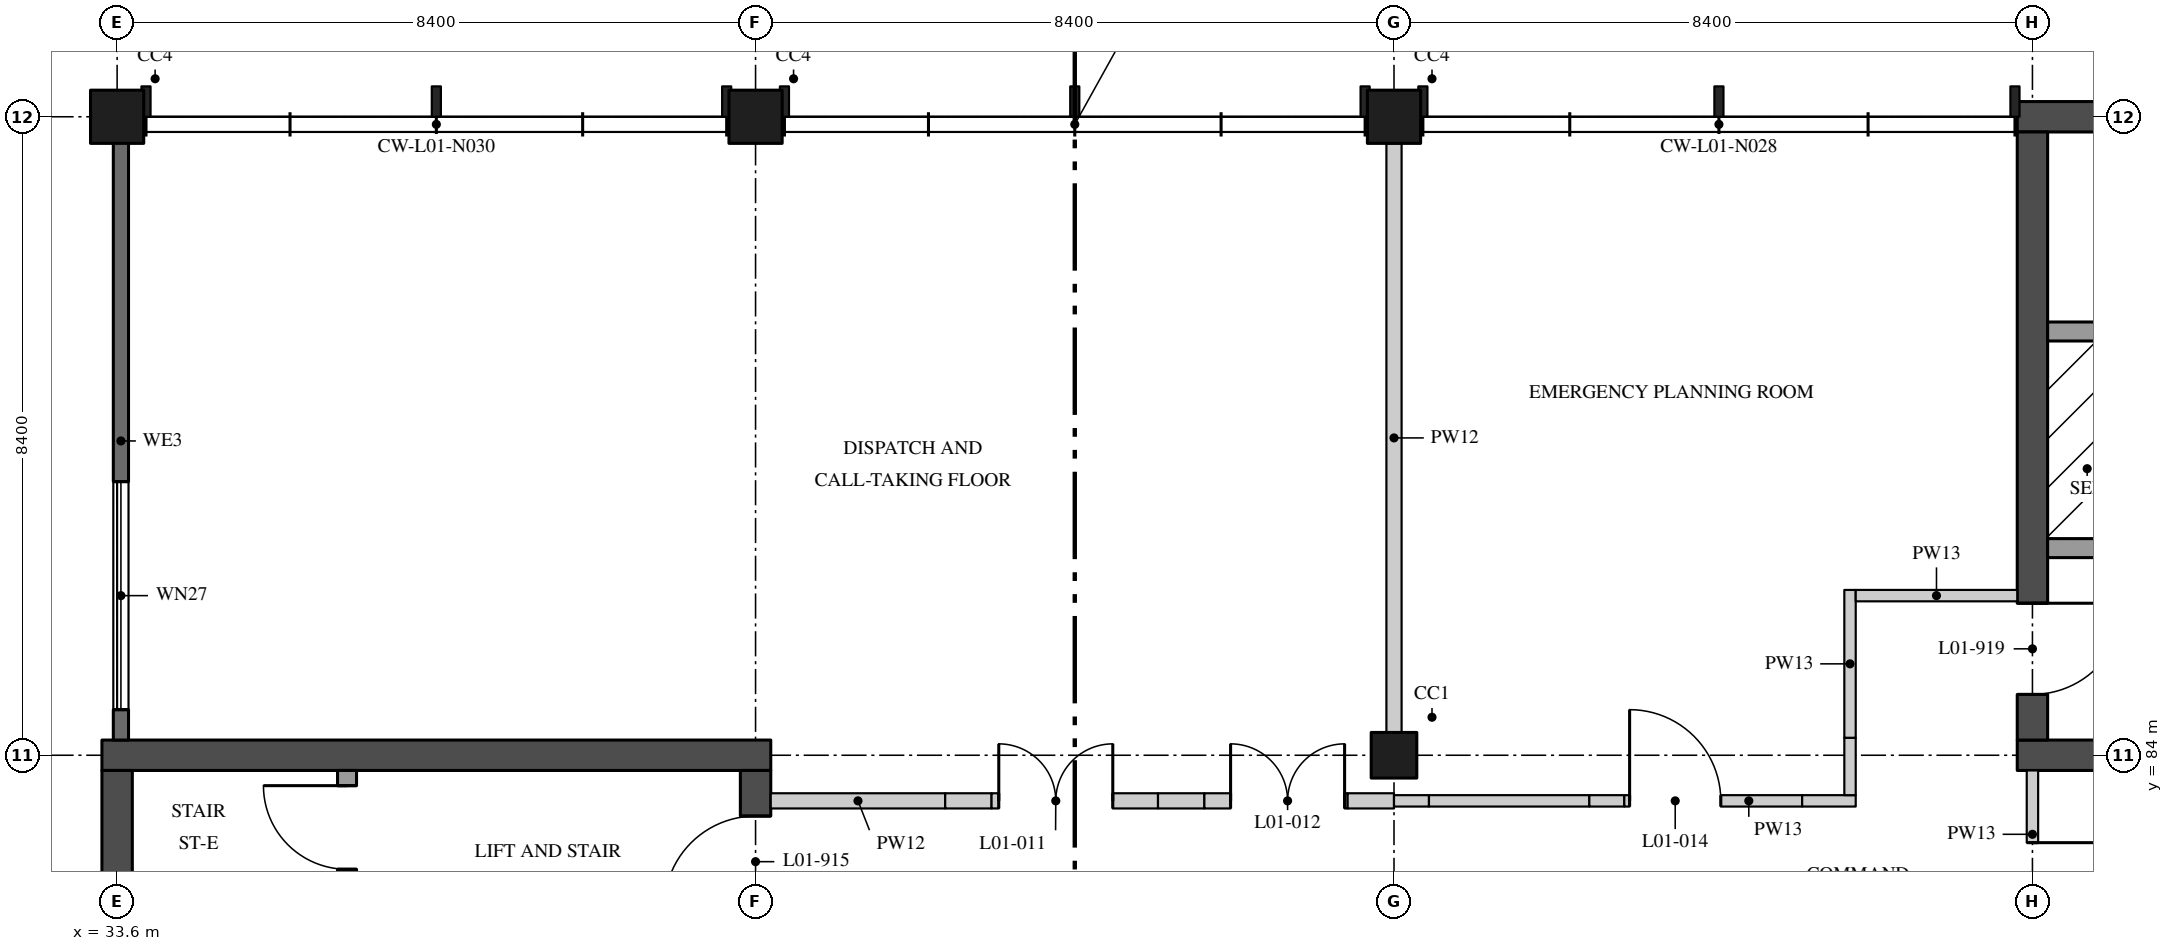
"""IFC4 building model, lengths in metres.
Left out: names, types, materials, properties, quantities, classifications, styles, units other than length and angle.
Written with IfcOpenShell. Run it as: python <this file> out.ifc"""

import sys

from ifc_helpers import new_model, si_unit, direction, frame, frame_2d, origin, origin_2d, place, context, subcontext, project, spatial, rectangle, extrude, element, fill, save


model = new_model("IFC4")
c1 = context("Model", 3, precision=1e-05, world=origin(), true_north=direction((0.0, 1.0)))
c2 = subcontext(c1, "Body", "Model", "MODEL_VIEW")
j1 = project(units=[si_unit("LENGTHUNIT", "METRE"), si_unit("PLANEANGLEUNIT", "RADIAN")], contexts=[c1])
p1 = place(None, origin())
s1 = spatial("IfcSite", under=j1, at=p1, CompositionType="ELEMENT")
p2 = place(p1, origin())
s2 = spatial("IfcBuilding", under=s1, at=p2, CompositionType="ELEMENT")
p3 = place(p2, frame((0.0, 0.0, 5.4)))
s3 = spatial("IfcBuildingStorey", under=s2, at=p3, CompositionType="ELEMENT", Elevation=5.4)
for number, where, z_axis, x_axis in (
    (1, (33.6, 92.4, 0.0), (0.0, 0.0, 1.0), (1.0, 0.0, 0.0)),
    (2, (42.0, 92.4, 0.0), (0.0, 0.0, 1.0), (1.0, 0.0, 0.0)),
):
    element("IfcColumn", number, at=place(p3, frame(where, z_axis=z_axis, x_axis=x_axis)), inside=s3, PredefinedType="COLUMN", context=c2, shape_type="SweptSolid", body=[
        extrude(rectangle(XDim=0.7, YDim=0.7, at=origin_2d()), origin(), (0.0, 0.0, 1.0), 4.37),
    ])
p4 = place(p3, frame((50.4, 84.0, 0.0), z_axis=(0.0, 0.0, 1.0), x_axis=(1.0, 0.0, 0.0)))
e3 = element("IfcColumn", 3, at=p4, inside=s3, PredefinedType="COLUMN", context=c2, shape_type="SweptSolid", body=[
    extrude(rectangle(XDim=0.6, YDim=0.6, at=origin_2d()), origin(), (0.0, 0.0, 1.0), 4.37),
])
p5 = place(p3, frame((50.4, 92.4, 0.0), z_axis=(0.0, 0.0, 1.0), x_axis=(1.0, 0.0, 0.0)))
e4 = element("IfcColumn", 4, at=p5, inside=s3, PredefinedType="COLUMN", context=c2, shape_type="SweptSolid", body=[
    extrude(rectangle(XDim=0.7, YDim=0.7, at=origin_2d()), origin(), (0.0, 0.0, 1.0), 4.37),
])
p6 = place(p3, frame((33.4, 84.0, 0.0), z_axis=(0.0, 0.0, 1.0), x_axis=(1.0, 0.0, 0.0)))
e5 = element("IfcWall", 5, at=p6, inside=s3, PredefinedType="SHEAR", context=c2, shape_type="SweptSolid", body=[
    extrude(rectangle(XDim=8.8, YDim=0.4, at=frame_2d((4.4, 0.0))), origin(), (0.0, 0.0, 1.0), 4.37),
])
p7 = place(p3, frame((33.6, 75.8, 0.0), z_axis=(0.0, 0.0, 1.0), x_axis=(0.0, 1.0, 0.0)))
e6 = element("IfcWall", 6, at=p7, inside=s3, PredefinedType="SHEAR", context=c2, shape_type="SweptSolid", body=[
    extrude(rectangle(XDim=8.0, YDim=0.4, at=frame_2d((4.0, 0.0))), origin(), (0.0, 0.0, 1.0), 4.37),
])
p8 = place(p3, frame((42.0, 75.8, 0.0), z_axis=(0.0, 0.0, 1.0), x_axis=(0.0, 1.0, 0.0)))
e7 = element("IfcWall", 7, at=p8, inside=s3, PredefinedType="SHEAR", context=c2, shape_type="SweptSolid", body=[
    extrude(rectangle(XDim=8.0, YDim=0.4, at=frame_2d((4.0, 0.0))), origin(), (0.0, 0.0, 1.0), 4.37),
])
p9 = place(p8, frame((6.2, 0.0, 0.0)))
e8 = element("IfcOpeningElement", 8, at=p9, cuts=e7, PredefinedType="OPENING", context=c2, shape_type="SweptSolid", body=[
    extrude(rectangle(XDim=1.2, YDim=2.1, at=frame_2d((0.6, 1.05))), frame((0.0, 0.21, 0.0), z_axis=(0.0, -1.0, 0.0), x_axis=(1.0, 0.0, 0.0)), (0.0, 0.0, 1.0), 0.42),
])
p10 = place(p3, frame((36.625, 83.8, 0.0), z_axis=(0.0, 0.0, 1.0), x_axis=(0.0, -1.0, 0.0)))
e9 = element("IfcWall", 9, at=p10, inside=s3, PredefinedType="SOLIDWALL", context=c2, shape_type="SweptSolid", body=[
    extrude(rectangle(XDim=8.0, YDim=0.25, at=frame_2d((4.0, 0.0))), origin(), (0.0, 0.0, 1.0), 4.37),
])
p11 = place(p10, frame((0.2, 0.0, 0.0)))
e10 = element("IfcOpeningElement", 10, at=p11, cuts=e9, PredefinedType="OPENING", context=c2, shape_type="SweptSolid", body=[
    extrude(rectangle(XDim=1.1, YDim=2.1, at=frame_2d((0.55, 1.05))), frame((0.0, 0.135, 0.0), z_axis=(0.0, -1.0, 0.0), x_axis=(1.0, 0.0, 0.0)), (0.0, 0.0, 1.0), 0.27),
])
for number, where, z_axis, x_axis in (
    (11, (58.6, 84.0, 0.0), (0.0, 0.0, 1.0), (1.0, 0.0, 0.0)),
    (12, (58.6, 92.4, 0.0), (0.0, 0.0, 1.0), (1.0, 0.0, 0.0)),
):
    element("IfcWall", number, at=place(p3, frame(where, z_axis=z_axis, x_axis=x_axis)), inside=s3, PredefinedType="SHEAR", context=c2, shape_type="SweptSolid", body=[
        extrude(rectangle(XDim=8.8, YDim=0.4, at=frame_2d((4.4, 0.0))), origin(), (0.0, 0.0, 1.0), 4.37),
    ])
p12 = place(p3, frame((58.8, 84.2, 0.0), z_axis=(0.0, 0.0, 1.0), x_axis=(0.0, 1.0, 0.0)))
e13 = element("IfcWall", 13, at=p12, inside=s3, PredefinedType="SHEAR", context=c2, shape_type="SweptSolid", body=[
    extrude(rectangle(XDim=8.0, YDim=0.4, at=frame_2d((4.0, 0.0))), origin(), (0.0, 0.0, 1.0), 4.37),
])
p13 = place(p12, frame((0.6, 0.0, 0.0)))
e14 = element("IfcOpeningElement", 14, at=p13, cuts=e13, PredefinedType="OPENING", context=c2, shape_type="SweptSolid", body=[
    extrude(rectangle(XDim=1.2, YDim=2.1, at=frame_2d((0.6, 1.05))), frame((0.0, 0.21, 0.0), z_axis=(0.0, -1.0, 0.0), x_axis=(1.0, 0.0, 0.0)), (0.0, 0.0, 1.0), 0.42),
])
p14 = place(p3, frame((61.8, 86.725, 0.0), z_axis=(0.0, 0.0, 1.0), x_axis=(-1.0, 0.0, 0.0)))
e15 = element("IfcWall", 15, at=p14, inside=s3, PredefinedType="SOLIDWALL", context=c2, shape_type="SweptSolid", body=[
    extrude(rectangle(XDim=2.8, YDim=0.25, at=frame_2d((1.4, 0.0))), origin(), (0.0, 0.0, 1.0), 4.37),
])
p15 = place(p3, frame((61.55, 89.575, 0.0), z_axis=(0.0, 0.0, 1.0), x_axis=(-1.0, 0.0, 0.0)))
e16 = element("IfcWall", 16, at=p15, inside=s3, PredefinedType="SOLIDWALL", context=c2, shape_type="SweptSolid", body=[
    extrude(rectangle(XDim=2.55, YDim=0.25, at=frame_2d((1.275, 0.0))), origin(), (0.0, 0.0, 1.0), 4.37),
])
p16 = place(p3, frame((58.8, 81.0, 0.0), z_axis=(0.0, 0.0, 1.0), x_axis=(0.0, 1.0, 0.0)))
e17 = element("IfcWall", 17, at=p16, inside=s3, PredefinedType="PARTITIONING", context=c2, shape_type="SweptSolid", body=[
    extrude(rectangle(XDim=2.8, YDim=0.15, at=frame_2d((1.4, 0.0))), origin(), (0.0, 0.0, 1.0), 3.746),
])
p17 = place(p16, frame((0.65, 0.0, 0.0)))
e18 = element("IfcOpeningElement", 18, at=p17, cuts=e17, PredefinedType="OPENING", context=c2, shape_type="SweptSolid", body=[
    extrude(rectangle(XDim=1.2, YDim=2.4, at=frame_2d((0.6, 1.2))), frame((0.0, 0.085, 0.0), z_axis=(0.0, -1.0, 0.0), x_axis=(1.0, 0.0, 0.0)), (0.0, 0.0, 1.0), 0.17),
])
p18 = place(p3, frame((42.2, 83.4, 0.0), z_axis=(0.0, 0.0, 1.0), x_axis=(1.0, 0.0, 0.0)))
e19 = element("IfcWall", 19, at=p18, inside=s3, PredefinedType="PARTITIONING", context=c2, shape_type="SweptSolid", body=[
    extrude(rectangle(XDim=2.295, YDim=0.2, at=frame_2d((1.147, 0.0))), origin(), (0.0, 0.0, 1.0), 4.37),
])
p19 = place(p3, frame((44.495, 83.4, 0.0), z_axis=(0.0, 0.0, 1.0), x_axis=(1.0, 0.0, 0.0)))
e20 = element("IfcWall", 20, at=p19, inside=s3, PredefinedType="PARTITIONING", context=c2, shape_type="SweptSolid", body=[
    extrude(rectangle(XDim=0.61, YDim=0.2, at=frame_2d((0.305, 0.0))), origin(), (0.0, 0.0, 1.0), 3.895),
])
p20 = place(p3, frame((45.105, 83.4, 0.0), z_axis=(0.0, 0.0, 1.0), x_axis=(1.0, 0.0, 0.0)))
e21 = element("IfcWall", 21, at=p20, inside=s3, PredefinedType="PARTITIONING", context=c2, shape_type="SweptSolid", body=[
    extrude(rectangle(XDim=2.19, YDim=0.2, at=frame_2d((1.095, 0.0))), origin(), (0.0, 0.0, 1.0), 4.37),
])
p21 = place(p20, frame((0.095, 0.0, 0.0)))
e22 = element("IfcOpeningElement", 22, at=p21, cuts=e21, PredefinedType="OPENING", context=c2, shape_type="SweptSolid", body=[
    extrude(rectangle(XDim=1.5, YDim=2.1, at=frame_2d((0.75, 1.05))), frame((0.0, 0.11, 0.0), z_axis=(0.0, -1.0, 0.0), x_axis=(1.0, 0.0, 0.0)), (0.0, 0.0, 1.0), 0.22),
])
p22 = place(p3, frame((47.295, 83.4, 0.0), z_axis=(0.0, 0.0, 1.0), x_axis=(1.0, 0.0, 0.0)))
e23 = element("IfcWall", 23, at=p22, inside=s3, PredefinedType="PARTITIONING", context=c2, shape_type="SweptSolid", body=[
    extrude(rectangle(XDim=0.61, YDim=0.2, at=frame_2d((0.305, 0.0))), origin(), (0.0, 0.0, 1.0), 3.895),
])
p23 = place(p3, frame((47.905, 83.4, 0.0), z_axis=(0.0, 0.0, 1.0), x_axis=(1.0, 0.0, 0.0)))
e24 = element("IfcWall", 24, at=p23, inside=s3, PredefinedType="PARTITIONING", context=c2, shape_type="SweptSolid", body=[
    extrude(rectangle(XDim=1.885, YDim=0.2, at=frame_2d((0.942, 0.0))), origin(), (0.0, 0.0, 1.0), 4.37),
])
p24 = place(p23, frame((0.345, 0.0, 0.0)))
e25 = element("IfcOpeningElement", 25, at=p24, cuts=e24, PredefinedType="OPENING", context=c2, shape_type="SweptSolid", body=[
    extrude(rectangle(XDim=1.5, YDim=2.1, at=frame_2d((0.75, 1.05))), frame((0.0, 0.11, 0.0), z_axis=(0.0, -1.0, 0.0), x_axis=(1.0, 0.0, 0.0)), (0.0, 0.0, 1.0), 0.22),
])
p25 = place(p3, frame((49.79, 83.4, 0.0), z_axis=(0.0, 0.0, 1.0), x_axis=(1.0, 0.0, 0.0)))
e26 = element("IfcWall", 26, at=p25, inside=s3, PredefinedType="PARTITIONING", context=c2, shape_type="SweptSolid", body=[
    extrude(rectangle(XDim=0.61, YDim=0.2, at=frame_2d((0.305, 0.0))), origin(), (0.0, 0.0, 1.0), 3.746),
])
p26 = place(p3, frame((50.4, 83.4, 0.0), z_axis=(0.0, 0.0, 1.0), x_axis=(1.0, 0.0, 0.0)))
e27 = element("IfcWall", 27, at=p26, inside=s3, PredefinedType="PARTITIONING", context=c2, shape_type="SweptSolid", body=[
    extrude(rectangle(XDim=0.46, YDim=0.15, at=frame_2d((0.23, 0.0))), origin(), (0.0, 0.0, 1.0), 3.746),
])
p27 = place(p3, frame((50.86, 83.4, 0.0), z_axis=(0.0, 0.0, 1.0), x_axis=(1.0, 0.0, 0.0)))
e28 = element("IfcWall", 28, at=p27, inside=s3, PredefinedType="PARTITIONING", context=c2, shape_type="SweptSolid", body=[
    extrude(rectangle(XDim=2.11, YDim=0.15, at=frame_2d((1.055, 0.0))), origin(), (0.0, 0.0, 1.0), 4.37),
])
p28 = place(p3, frame((52.97, 83.4, 0.0), z_axis=(0.0, 0.0, 1.0), x_axis=(1.0, 0.0, 0.0)))
e29 = element("IfcWall", 29, at=p28, inside=s3, PredefinedType="PARTITIONING", context=c2, shape_type="SweptSolid", body=[
    extrude(rectangle(XDim=0.46, YDim=0.15, at=frame_2d((0.23, 0.0))), origin(), (0.0, 0.0, 1.0), 3.895),
])
p29 = place(p3, frame((53.43, 83.4, 0.0), z_axis=(0.0, 0.0, 1.0), x_axis=(1.0, 0.0, 0.0)))
e30 = element("IfcWall", 30, at=p29, inside=s3, PredefinedType="PARTITIONING", context=c2, shape_type="SweptSolid", body=[
    extrude(rectangle(XDim=2.34, YDim=0.15, at=frame_2d((1.17, 0.0))), origin(), (0.0, 0.0, 1.0), 4.37),
])
p30 = place(p29, frame((0.07, 0.0, 0.0)))
e31 = element("IfcOpeningElement", 31, at=p30, cuts=e30, PredefinedType="OPENING", context=c2, shape_type="SweptSolid", body=[
    extrude(rectangle(XDim=1.2, YDim=2.4, at=frame_2d((0.6, 1.2))), frame((0.0, 0.085, 0.0), z_axis=(0.0, -1.0, 0.0), x_axis=(1.0, 0.0, 0.0)), (0.0, 0.0, 1.0), 0.17),
])
p31 = place(p3, frame((55.77, 83.4, 0.0), z_axis=(0.0, 0.0, 1.0), x_axis=(1.0, 0.0, 0.0)))
e32 = element("IfcWall", 32, at=p31, inside=s3, PredefinedType="PARTITIONING", context=c2, shape_type="SweptSolid", body=[
    extrude(rectangle(XDim=0.705, YDim=0.15, at=frame_2d((0.353, 0.0))), origin(), (0.0, 0.0, 1.0), 3.895),
])
p32 = place(p3, frame((56.4, 83.475, 0.0), z_axis=(0.0, 0.0, 1.0), x_axis=(0.0, 1.0, 0.0)))
e33 = element("IfcWall", 33, at=p32, inside=s3, PredefinedType="PARTITIONING", context=c2, shape_type="SweptSolid", body=[
    extrude(rectangle(XDim=0.755, YDim=0.15, at=frame_2d((0.377, 0.0))), origin(), (0.0, 0.0, 1.0), 3.746),
])
p33 = place(p3, frame((56.4, 84.23, 0.0), z_axis=(0.0, 0.0, 1.0), x_axis=(0.0, 1.0, 0.0)))
e34 = element("IfcWall", 34, at=p33, inside=s3, PredefinedType="PARTITIONING", context=c2, shape_type="SweptSolid", body=[
    extrude(rectangle(XDim=1.945, YDim=0.15, at=frame_2d((0.973, 0.0))), origin(), (0.0, 0.0, 1.0), 4.37),
])
p34 = place(p3, frame((56.475, 86.1, 0.0), z_axis=(0.0, 0.0, 1.0), x_axis=(1.0, 0.0, 0.0)))
e35 = element("IfcWall", 35, at=p34, inside=s3, PredefinedType="PARTITIONING", context=c2, shape_type="SweptSolid", body=[
    extrude(rectangle(XDim=2.125, YDim=0.15, at=frame_2d((1.062, 0.0))), origin(), (0.0, 0.0, 1.0), 4.37),
])
p35 = place(p3, frame((50.4, 84.3, 0.0), z_axis=(0.0, 0.0, 1.0), x_axis=(0.0, 1.0, 0.0)))
e36 = element("IfcWall", 36, at=p35, inside=s3, PredefinedType="PARTITIONING", context=c2, shape_type="SweptSolid", body=[
    extrude(rectangle(XDim=7.75, YDim=0.2, at=frame_2d((3.875, 0.0))), origin(), (0.0, 0.0, 1.0), 3.746),
])
p36 = place(p3, frame((33.65, 92.07, 0.0), z_axis=(0.0, 0.0, 1.0), x_axis=(0.0, -1.0, 0.0)))
e37 = element("IfcWall", 37, at=p36, inside=s3, PredefinedType="SOLIDWALL", context=c2, shape_type="SweptSolid", body=[
    extrude(rectangle(XDim=7.87, YDim=0.2, at=frame_2d((3.935, 0.0))), origin(), (0.0, 0.0, 1.0), 3.746),
])
p37 = place(p36, frame((4.47, 0.0, 0.9)))
e38 = element("IfcOpeningElement", 38, at=p37, cuts=e37, PredefinedType="OPENING", context=c2, shape_type="SweptSolid", body=[
    extrude(rectangle(XDim=3.0, YDim=2.1, at=frame_2d((1.5, 1.05))), frame((0.0, 0.11, 0.0), z_axis=(0.0, -1.0, 0.0), x_axis=(1.0, 0.0, 0.0)), (0.0, 0.0, 1.0), 0.22),
])
p38 = place(p9, origin())
e39 = element("IfcDoor", 39, at=p38, inside=s3, OperationType="SINGLE_SWING_RIGHT", PredefinedType="DOOR", context=c2, shape_type="SweptSolid", body=[
    extrude(rectangle(XDim=1.2, YDim=2.1, at=frame_2d((0.6, 1.05))), frame((0.0, 0.035, 0.0), z_axis=(0.0, -1.0, 0.0), x_axis=(1.0, 0.0, 0.0)), (0.0, 0.0, 1.0), 0.07),
])
fill(e8, e39)
p39 = place(p11, frame((1.1, 0.0, 0.0), z_axis=(0.0, 0.0, 1.0), x_axis=(-1.0, 0.0, 0.0)))
e40 = element("IfcDoor", 40, at=p39, inside=s3, OperationType="SINGLE_SWING_LEFT", PredefinedType="DOOR", context=c2, shape_type="SweptSolid", body=[
    extrude(rectangle(XDim=1.1, YDim=2.1, at=frame_2d((0.55, 1.05))), frame((0.0, 0.035, 0.0), z_axis=(0.0, -1.0, 0.0), x_axis=(1.0, 0.0, 0.0)), (0.0, 0.0, 1.0), 0.07),
])
fill(e10, e40)
p40 = place(p13, frame((1.2, 0.0, 0.0), z_axis=(0.0, 0.0, 1.0), x_axis=(-1.0, 0.0, 0.0)))
e41 = element("IfcDoor", 41, at=p40, inside=s3, OperationType="SINGLE_SWING_RIGHT", PredefinedType="DOOR", context=c2, shape_type="SweptSolid", body=[
    extrude(rectangle(XDim=1.2, YDim=2.1, at=frame_2d((0.6, 1.05))), frame((0.0, 0.035, 0.0), z_axis=(0.0, -1.0, 0.0), x_axis=(1.0, 0.0, 0.0)), (0.0, 0.0, 1.0), 0.07),
])
fill(e14, e41)
p41 = place(p17, frame((1.2, 0.0, 0.0), z_axis=(0.0, 0.0, 1.0), x_axis=(-1.0, 0.0, 0.0)))
e42 = element("IfcDoor", 42, at=p41, inside=s3, OperationType="SINGLE_SWING_RIGHT", PredefinedType="DOOR", context=c2, shape_type="SweptSolid", body=[
    extrude(rectangle(XDim=1.2, YDim=2.4, at=frame_2d((0.6, 1.2))), frame((0.0, 0.025, 0.0), z_axis=(0.0, -1.0, 0.0), x_axis=(1.0, 0.0, 0.0)), (0.0, 0.0, 1.0), 0.05),
])
fill(e18, e42)
p42 = place(p21, origin())
e43 = element("IfcDoor", 43, at=p42, inside=s3, OperationType="DOUBLE_DOOR_SINGLE_SWING", PredefinedType="DOOR", context=c2, shape_type="SweptSolid", body=[
    extrude(rectangle(XDim=1.5, YDim=2.1, at=frame_2d((0.75, 1.05))), frame((0.0, 0.03, 0.0), z_axis=(0.0, -1.0, 0.0), x_axis=(1.0, 0.0, 0.0)), (0.0, 0.0, 1.0), 0.06),
])
fill(e22, e43)
p43 = place(p24, origin())
e44 = element("IfcDoor", 44, at=p43, inside=s3, OperationType="DOUBLE_DOOR_SINGLE_SWING", PredefinedType="DOOR", context=c2, shape_type="SweptSolid", body=[
    extrude(rectangle(XDim=1.5, YDim=2.1, at=frame_2d((0.75, 1.05))), frame((0.0, 0.03, 0.0), z_axis=(0.0, -1.0, 0.0), x_axis=(1.0, 0.0, 0.0)), (0.0, 0.0, 1.0), 0.06),
])
fill(e25, e44)
p44 = place(p30, origin())
e45 = element("IfcDoor", 45, at=p44, inside=s3, OperationType="SINGLE_SWING_RIGHT", PredefinedType="DOOR", context=c2, shape_type="SweptSolid", body=[
    extrude(rectangle(XDim=1.2, YDim=2.4, at=frame_2d((0.6, 1.2))), frame((0.0, 0.025, 0.0), z_axis=(0.0, -1.0, 0.0), x_axis=(1.0, 0.0, 0.0)), (0.0, 0.0, 1.0), 0.05),
])
fill(e31, e45)
p45 = place(p37, origin())
e46 = element("IfcWindow", 46, at=p45, inside=s3, PartitioningType="SINGLE_PANEL", PredefinedType="WINDOW", context=c2, shape_type="SweptSolid", body=[
    extrude(rectangle(XDim=3.0, YDim=2.1, at=frame_2d((1.5, 1.05))), frame((0.0, 0.04, 0.0), z_axis=(0.0, -1.0, 0.0), x_axis=(1.0, 0.0, 0.0)), (0.0, 0.0, 1.0), 0.08),
])
fill(e38, e46)
save(model, sys.argv[1])
